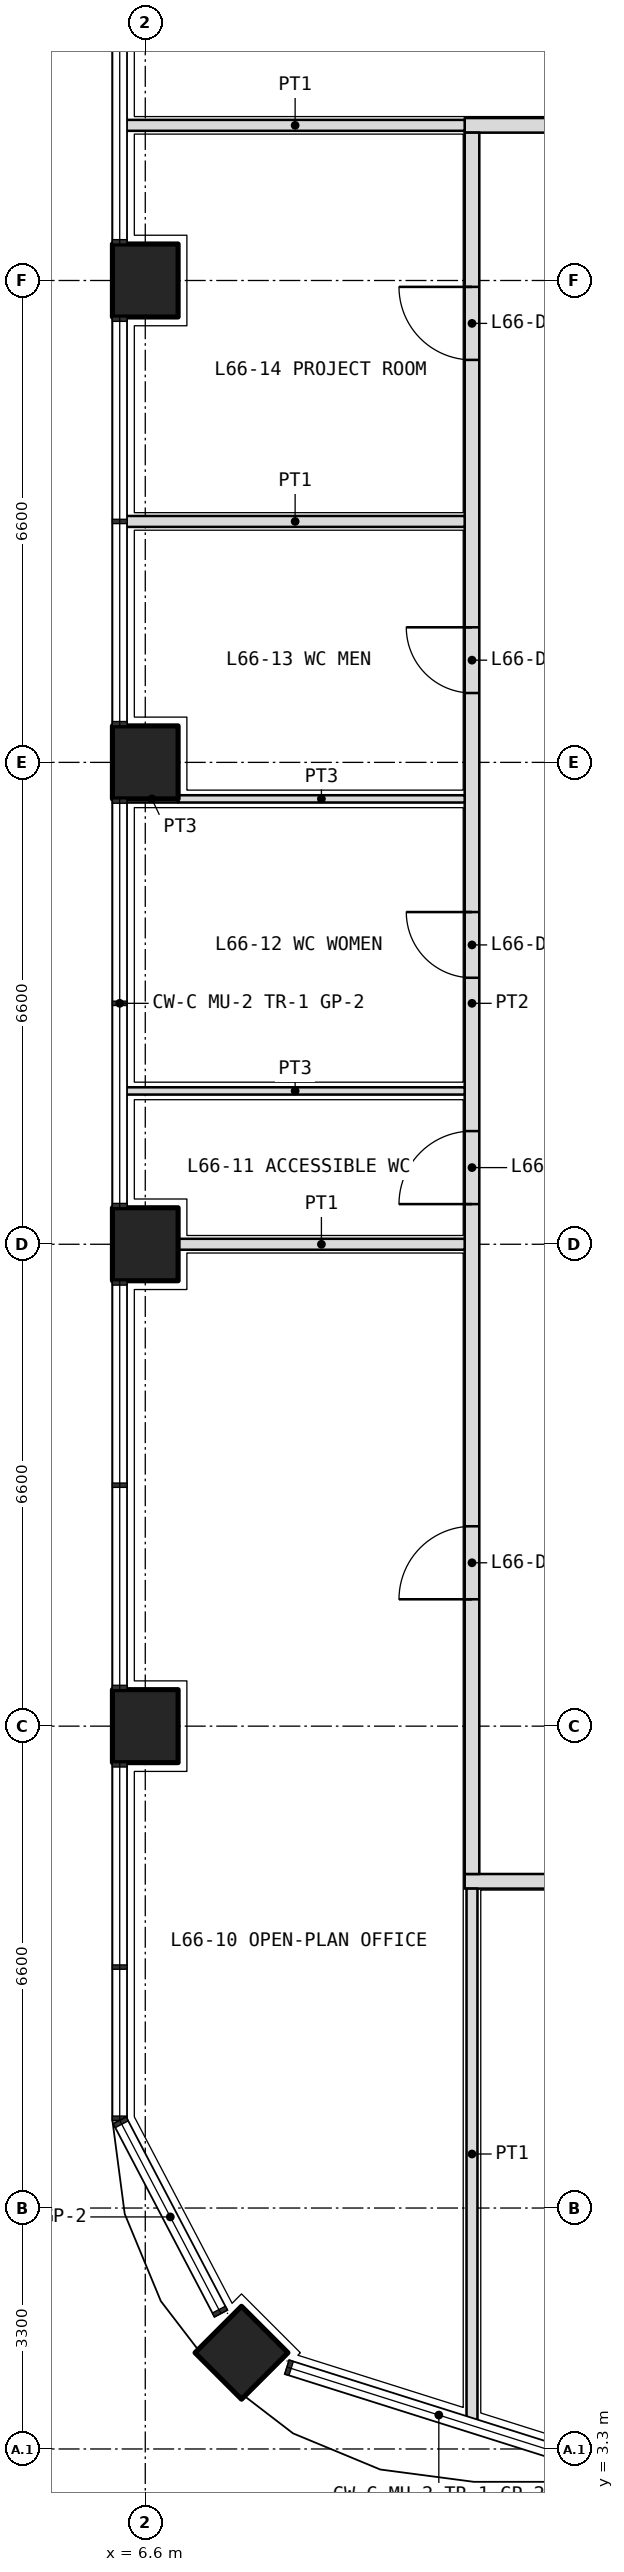
"""IFC4 building model, lengths in metres.
Left out: names, types, materials, properties, quantities, classifications, styles, units other than length and angle.
Written with IfcOpenShell. Run it as: python <this file> out.ifc"""

import sys

from ifc_helpers import new_model, si_unit, direction, frame, frame_2d, origin, origin_2d, place, context, subcontext, project, spatial, rectangle, extrude, element, fill, save


model = new_model("IFC4")
c1 = context("Model", 3, precision=1e-05, world=origin(), true_north=direction((0.0, 1.0)))
c2 = subcontext(c1, "Body", "Model", "MODEL_VIEW")
j1 = project(units=[si_unit("LENGTHUNIT", "METRE"), si_unit("PLANEANGLEUNIT", "RADIAN")], contexts=[c1])
p1 = place(None, origin())
s1 = spatial("IfcSite", under=j1, at=p1, CompositionType="ELEMENT")
p2 = place(p1, origin())
s2 = spatial("IfcBuilding", under=s1, at=p2, CompositionType="ELEMENT")
p3 = place(p2, frame((0.0, 0.0, 288.0)))
s3 = spatial("IfcBuildingStorey", under=s2, at=p3, CompositionType="ELEMENT", Elevation=288.0)
p4 = place(p3, frame((7.918, 4.618, 0.0), z_axis=(0.0, 0.0, 1.0), x_axis=(0.707106781187, 0.707106781187, 0.0)))
e1 = element("IfcColumn", 1, at=p4, inside=s3, PredefinedType="COLUMN", context=c2, shape_type="SweptSolid", body=[
    extrude(rectangle(XDim=0.9, YDim=0.9, at=origin_2d()), origin(), (0.0, 0.0, 1.0), 4.8),
])
for number, where, z_axis, x_axis in (
    (2, (6.6, 13.2, 0.0), (0.0, 0.0, 1.0), (0.0, 1.0, 0.0)),
    (3, (6.6, 19.8, 0.0), (0.0, 0.0, 1.0), (0.0, 1.0, 0.0)),
    (4, (6.6, 26.4, 0.0), (0.0, 0.0, 1.0), (0.0, 1.0, 0.0)),
    (5, (6.6, 33.0, 0.0), (0.0, 0.0, 1.0), (0.0, 1.0, 0.0)),
):
    element("IfcColumn", number, at=place(p3, frame(where, z_axis=z_axis, x_axis=x_axis)), inside=s3, PredefinedType="COLUMN", context=c2, shape_type="SweptSolid", body=[
        extrude(rectangle(XDim=1.0, YDim=0.9, at=origin_2d()), origin(), (0.0, 0.0, 1.0), 4.8),
    ])
p5 = place(p3, frame((10.975, 11.075, 0.0), z_axis=(0.0, 0.0, 1.0), x_axis=(1.0, 0.0, 0.0)))
e6 = element("IfcWall", 6, at=p5, inside=s3, PredefinedType="PARTITIONING", context=c2, shape_type="SweptSolid", body=[
    extrude(rectangle(XDim=30.85, YDim=0.2, at=frame_2d((15.425, 0.0))), origin(), (0.0, 0.0, 1.0), 3.1),
])
p6 = place(p5, frame((10.562, 0.0, 0.0)))
e7 = element("IfcOpeningElement", 7, at=p6, cuts=e6, PredefinedType="OPENING", context=c2, shape_type="SweptSolid", body=[
    extrude(rectangle(XDim=1.0, YDim=2.1, at=frame_2d((0.5, 1.05))), frame((0.0, 0.11, 0.0), z_axis=(0.0, -1.0, 0.0), x_axis=(1.0, 0.0, 0.0)), (0.0, 0.0, 1.0), 0.22),
])
p7 = place(p5, frame((25.887, 0.0, 0.0)))
e8 = element("IfcOpeningElement", 8, at=p7, cuts=e6, PredefinedType="OPENING", context=c2, shape_type="SweptSolid", body=[
    extrude(rectangle(XDim=1.0, YDim=2.1, at=frame_2d((0.5, 1.05))), frame((0.0, 0.11, 0.0), z_axis=(0.0, -1.0, 0.0), x_axis=(1.0, 0.0, 0.0)), (0.0, 0.0, 1.0), 0.22),
])
p8 = place(p3, frame((10.975, 35.125, 0.0), z_axis=(0.0, 0.0, 1.0), x_axis=(1.0, 0.0, 0.0)))
e9 = element("IfcWall", 9, at=p8, inside=s3, PredefinedType="PARTITIONING", context=c2, shape_type="SweptSolid", body=[
    extrude(rectangle(XDim=30.85, YDim=0.2, at=frame_2d((15.425, 0.0))), origin(), (0.0, 0.0, 1.0), 3.1),
])
p9 = place(p8, frame((3.562, 0.0, 0.0)))
e10 = element("IfcOpeningElement", 10, at=p9, cuts=e9, PredefinedType="OPENING", context=c2, shape_type="SweptSolid", body=[
    extrude(rectangle(XDim=1.8, YDim=2.1, at=frame_2d((0.9, 1.05))), frame((0.0, 0.11, 0.0), z_axis=(0.0, -1.0, 0.0), x_axis=(1.0, 0.0, 0.0)), (0.0, 0.0, 1.0), 0.22),
])
p10 = place(p8, frame((14.925, 0.0, 0.0)))
e11 = element("IfcOpeningElement", 11, at=p10, cuts=e9, PredefinedType="OPENING", context=c2, shape_type="SweptSolid", body=[
    extrude(rectangle(XDim=1.0, YDim=2.1, at=frame_2d((0.5, 1.05))), frame((0.0, 0.11, 0.0), z_axis=(0.0, -1.0, 0.0), x_axis=(1.0, 0.0, 0.0)), (0.0, 0.0, 1.0), 0.22),
])
p11 = place(p8, frame((25.887, 0.0, 0.0)))
e12 = element("IfcOpeningElement", 12, at=p11, cuts=e9, PredefinedType="OPENING", context=c2, shape_type="SweptSolid", body=[
    extrude(rectangle(XDim=1.0, YDim=2.1, at=frame_2d((0.5, 1.05))), frame((0.0, 0.11, 0.0), z_axis=(0.0, -1.0, 0.0), x_axis=(1.0, 0.0, 0.0)), (0.0, 0.0, 1.0), 0.22),
])
p12 = place(p3, frame((11.075, 11.175, 0.0), z_axis=(0.0, 0.0, 1.0), x_axis=(0.0, 1.0, 0.0)))
e13 = element("IfcWall", 13, at=p12, inside=s3, PredefinedType="PARTITIONING", context=c2, shape_type="SweptSolid", body=[
    extrude(rectangle(XDim=23.85, YDim=0.2, at=frame_2d((11.925, 0.0))), origin(), (0.0, 0.0, 1.0), 3.1),
])
p13 = place(p12, frame((3.762, 0.0, 0.0)))
e14 = element("IfcOpeningElement", 14, at=p13, cuts=e13, PredefinedType="OPENING", context=c2, shape_type="SweptSolid", body=[
    extrude(rectangle(XDim=1.0, YDim=2.1, at=frame_2d((0.5, 1.05))), frame((0.0, 0.11, 0.0), z_axis=(0.0, -1.0, 0.0), x_axis=(1.0, 0.0, 0.0)), (0.0, 0.0, 1.0), 0.22),
])
p14 = place(p12, frame((9.175, 0.0, 0.0)))
e15 = element("IfcOpeningElement", 15, at=p14, cuts=e13, PredefinedType="OPENING", context=c2, shape_type="SweptSolid", body=[
    extrude(rectangle(XDim=1.0, YDim=2.1, at=frame_2d((0.5, 1.05))), frame((0.0, 0.11, 0.0), z_axis=(0.0, -1.0, 0.0), x_axis=(1.0, 0.0, 0.0)), (0.0, 0.0, 1.0), 0.22),
])
p15 = place(p12, frame((12.275, 0.0, 0.0)))
e16 = element("IfcOpeningElement", 16, at=p15, cuts=e13, PredefinedType="OPENING", context=c2, shape_type="SweptSolid", body=[
    extrude(rectangle(XDim=0.9, YDim=2.1, at=frame_2d((0.45, 1.05))), frame((0.0, 0.11, 0.0), z_axis=(0.0, -1.0, 0.0), x_axis=(1.0, 0.0, 0.0)), (0.0, 0.0, 1.0), 0.22),
])
p16 = place(p12, frame((16.175, 0.0, 0.0)))
e17 = element("IfcOpeningElement", 17, at=p16, cuts=e13, PredefinedType="OPENING", context=c2, shape_type="SweptSolid", body=[
    extrude(rectangle(XDim=0.9, YDim=2.1, at=frame_2d((0.45, 1.05))), frame((0.0, 0.11, 0.0), z_axis=(0.0, -1.0, 0.0), x_axis=(1.0, 0.0, 0.0)), (0.0, 0.0, 1.0), 0.22),
])
p17 = place(p12, frame((20.738, 0.0, 0.0)))
e18 = element("IfcOpeningElement", 18, at=p17, cuts=e13, PredefinedType="OPENING", context=c2, shape_type="SweptSolid", body=[
    extrude(rectangle(XDim=1.0, YDim=2.1, at=frame_2d((0.5, 1.05))), frame((0.0, 0.11, 0.0), z_axis=(0.0, -1.0, 0.0), x_axis=(1.0, 0.0, 0.0)), (0.0, 0.0, 1.0), 0.22),
])
p18 = place(p3, frame((11.075, 3.705, 0.0), z_axis=(0.0, 0.0, 1.0), x_axis=(0.0, 1.0, 0.0)))
e19 = element("IfcWall", 19, at=p18, inside=s3, PredefinedType="PARTITIONING", context=c2, shape_type="SweptSolid", body=[
    extrude(rectangle(XDim=7.27, YDim=0.15, at=frame_2d((3.635, 0.0))), origin(), (0.0, 0.0, 1.0), 3.1),
])
p19 = place(p3, frame((6.33, 35.125, 0.0), z_axis=(0.0, 0.0, 1.0), x_axis=(1.0, 0.0, 0.0)))
e20 = element("IfcWall", 20, at=p19, inside=s3, PredefinedType="PARTITIONING", context=c2, shape_type="SweptSolid", body=[
    extrude(rectangle(XDim=4.645, YDim=0.15, at=frame_2d((2.323, 0.0))), origin(), (0.0, 0.0, 1.0), 3.1),
])
p20 = place(p3, frame((6.33, 21.9, 0.0), z_axis=(0.0, 0.0, 1.0), x_axis=(1.0, 0.0, 0.0)))
e21 = element("IfcWall", 21, at=p20, inside=s3, PredefinedType="PARTITIONING", context=c2, shape_type="SweptSolid", body=[
    extrude(rectangle(XDim=4.645, YDim=0.1, at=frame_2d((2.323, 0.0))), origin(), (0.0, 0.0, 1.0), 3.2),
])
p21 = place(p3, frame((6.33, 25.9, 0.0), z_axis=(0.0, 0.0, 1.0), x_axis=(1.0, 0.0, 0.0)))
e22 = element("IfcWall", 22, at=p21, inside=s3, PredefinedType="PARTITIONING", context=c2, shape_type="SweptSolid", body=[
    extrude(rectangle(XDim=0.72, YDim=0.1, at=frame_2d((0.36, 0.0))), origin(), (0.0, 0.0, 1.0), 3.1),
])
p22 = place(p3, frame((7.05, 25.9, 0.0), z_axis=(0.0, 0.0, 1.0), x_axis=(1.0, 0.0, 0.0)))
e23 = element("IfcWall", 23, at=p22, inside=s3, PredefinedType="PARTITIONING", context=c2, shape_type="SweptSolid", body=[
    extrude(rectangle(XDim=3.925, YDim=0.1, at=frame_2d((1.962, 0.0))), origin(), (0.0, 0.0, 1.0), 3.1),
])
p23 = place(p3, frame((6.33, 29.7, 0.0), z_axis=(0.0, 0.0, 1.0), x_axis=(1.0, 0.0, 0.0)))
e24 = element("IfcWall", 24, at=p23, inside=s3, PredefinedType="PARTITIONING", context=c2, shape_type="SweptSolid", body=[
    extrude(rectangle(XDim=4.645, YDim=0.15, at=frame_2d((2.323, 0.0))), origin(), (0.0, 0.0, 1.0), 3.2),
])
p24 = place(p3, frame((7.05, 19.8, 0.0), z_axis=(0.0, 0.0, 1.0), x_axis=(1.0, 0.0, 0.0)))
e25 = element("IfcWall", 25, at=p24, inside=s3, PredefinedType="PARTITIONING", context=c2, shape_type="SweptSolid", body=[
    extrude(rectangle(XDim=3.925, YDim=0.15, at=frame_2d((1.962, 0.0))), origin(), (0.0, 0.0, 1.0), 3.1),
])
p25 = place(p13, origin())
e26 = element("IfcDoor", 26, at=p25, inside=s3, OperationType="SINGLE_SWING_LEFT", PredefinedType="DOOR", context=c2, shape_type="SweptSolid", body=[
    extrude(rectangle(XDim=1.0, YDim=2.1, at=frame_2d((0.5, 1.05))), frame((0.0, 0.025, 0.0), z_axis=(0.0, -1.0, 0.0), x_axis=(1.0, 0.0, 0.0)), (0.0, 0.0, 1.0), 0.05),
])
fill(e14, e26)
p26 = place(p14, origin())
e27 = element("IfcDoor", 27, at=p26, inside=s3, OperationType="SINGLE_SWING_LEFT", PredefinedType="DOOR", context=c2, shape_type="SweptSolid", body=[
    extrude(rectangle(XDim=1.0, YDim=2.1, at=frame_2d((0.5, 1.05))), frame((0.0, 0.025, 0.0), z_axis=(0.0, -1.0, 0.0), x_axis=(1.0, 0.0, 0.0)), (0.0, 0.0, 1.0), 0.05),
])
fill(e15, e27)
p27 = place(p15, origin())
e28 = element("IfcDoor", 28, at=p27, inside=s3, OperationType="SINGLE_SWING_RIGHT", PredefinedType="DOOR", context=c2, shape_type="SweptSolid", body=[
    extrude(rectangle(XDim=0.9, YDim=2.1, at=frame_2d((0.45, 1.05))), frame((0.0, 0.025, 0.0), z_axis=(0.0, -1.0, 0.0), x_axis=(1.0, 0.0, 0.0)), (0.0, 0.0, 1.0), 0.05),
])
fill(e16, e28)
p28 = place(p16, origin())
e29 = element("IfcDoor", 29, at=p28, inside=s3, OperationType="SINGLE_SWING_RIGHT", PredefinedType="DOOR", context=c2, shape_type="SweptSolid", body=[
    extrude(rectangle(XDim=0.9, YDim=2.1, at=frame_2d((0.45, 1.05))), frame((0.0, 0.025, 0.0), z_axis=(0.0, -1.0, 0.0), x_axis=(1.0, 0.0, 0.0)), (0.0, 0.0, 1.0), 0.05),
])
fill(e17, e29)
p29 = place(p17, origin())
e30 = element("IfcDoor", 30, at=p29, inside=s3, OperationType="SINGLE_SWING_RIGHT", PredefinedType="DOOR", context=c2, shape_type="SweptSolid", body=[
    extrude(rectangle(XDim=1.0, YDim=2.1, at=frame_2d((0.5, 1.05))), frame((0.0, 0.025, 0.0), z_axis=(0.0, -1.0, 0.0), x_axis=(1.0, 0.0, 0.0)), (0.0, 0.0, 1.0), 0.05),
])
fill(e18, e30)
save(model, sys.argv[1])
